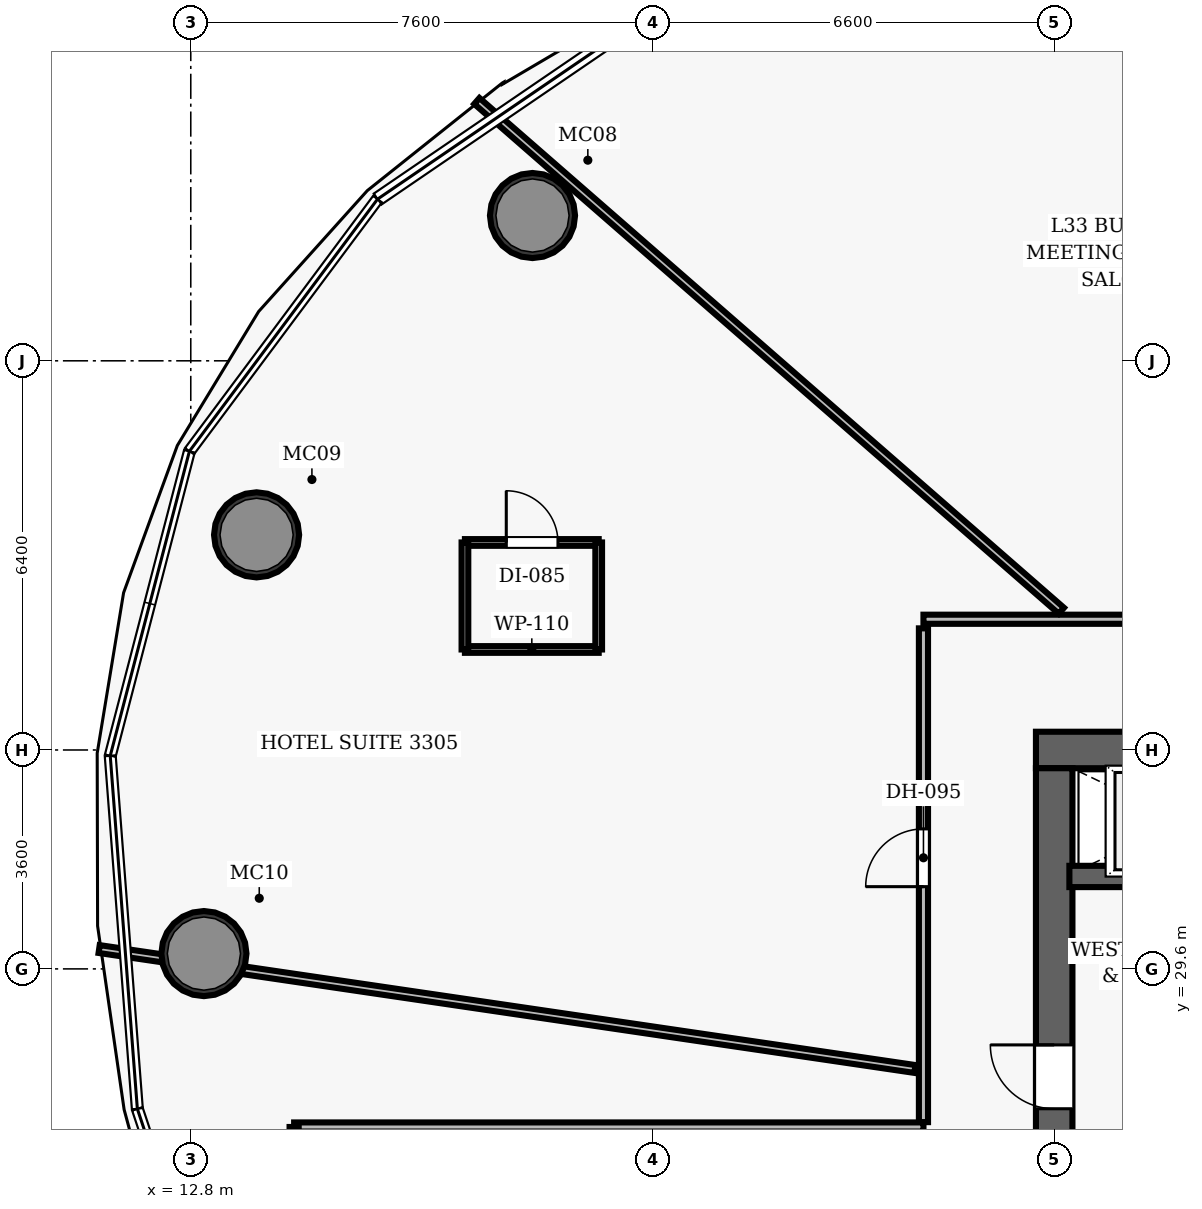
"""IFC4 building model, lengths in metres.
Left out: names, types, materials, properties, quantities, classifications, styles, units other than length and angle.
Written with IfcOpenShell. Run it as: python <this file> out.ifc"""

import sys

from ifc_helpers import new_model, si_unit, direction, frame, frame_2d, origin, origin_2d, place, context, subcontext, project, spatial, rectangle, hollow_circle, extrude, element, fill, save


model = new_model("IFC4")
c1 = context("Model", 3, precision=1e-05, world=origin(), true_north=direction((0.0, 1.0)))
c2 = subcontext(c1, "Body", "Model", "MODEL_VIEW")
j1 = project(units=[si_unit("LENGTHUNIT", "METRE"), si_unit("PLANEANGLEUNIT", "RADIAN")], contexts=[c1])
p1 = place(None, origin())
s1 = spatial("IfcSite", under=j1, at=p1, CompositionType="ELEMENT")
p2 = place(p1, origin())
s2 = spatial("IfcBuilding", under=s1, at=p2, CompositionType="ELEMENT")
p3 = place(p2, frame((0.0, 0.0, 134.3)))
s3 = spatial("IfcBuildingStorey", under=s2, at=p3, CompositionType="ELEMENT", Elevation=134.3)
p4 = place(p3, frame((26.7, 33.2, 0.0), z_axis=(0.0, 0.0, 1.0), x_axis=(1.0, 0.0, 0.0)))
e1 = element("IfcWall", 1, at=p4, inside=s3, PredefinedType="SHEAR", context=c2, shape_type="SweptSolid", body=[
    extrude(rectangle(XDim=22.6, YDim=0.6, at=frame_2d((11.3, 0.0))), origin(), (0.0, 0.0, 1.0), 3.5),
])
p5 = place(p4, frame((4.62, 0.0, 0.0)))
e2 = element("IfcOpeningElement", 2, at=p5, cuts=e1, PredefinedType="OPENING", context=c2, shape_type="SweptSolid", body=[
    extrude(rectangle(XDim=1.05, YDim=2.15, at=frame_2d((0.525, 1.075))), frame((0.0, 0.31, 0.0), z_axis=(0.0, -1.0, 0.0), x_axis=(1.0, 0.0, 0.0)), (0.0, 0.0, 1.0), 0.62),
])
p6 = place(p4, frame((14.52, 0.0, 0.0)))
e3 = element("IfcOpeningElement", 3, at=p6, cuts=e1, PredefinedType="OPENING", context=c2, shape_type="SweptSolid", body=[
    extrude(rectangle(XDim=1.05, YDim=2.15, at=frame_2d((0.525, 1.075))), frame((0.0, 0.31, 0.0), z_axis=(0.0, -1.0, 0.0), x_axis=(1.0, 0.0, 0.0)), (0.0, 0.0, 1.0), 0.62),
])
p7 = place(p3, frame((27.0, 19.1, 0.0), z_axis=(0.0, 0.0, 1.0), x_axis=(0.0, 1.0, 0.0)))
e4 = element("IfcWall", 4, at=p7, inside=s3, PredefinedType="SHEAR", context=c2, shape_type="SweptSolid", body=[
    extrude(rectangle(XDim=13.8, YDim=0.6, at=frame_2d((6.9, 0.0))), origin(), (0.0, 0.0, 1.0), 3.5),
])
p8 = place(p7, frame((8.2, 0.0, 0.0)))
e5 = element("IfcOpeningElement", 5, at=p8, cuts=e4, PredefinedType="OPENING", context=c2, shape_type="SweptSolid", body=[
    extrude(rectangle(XDim=1.05, YDim=2.15, at=frame_2d((0.525, 1.075))), frame((0.0, 0.31, 0.0), z_axis=(0.0, -1.0, 0.0), x_axis=(1.0, 0.0, 0.0)), (0.0, 0.0, 1.0), 0.62),
])
for number, where, z_axis, x_axis in (
    (6, (18.42, 41.989, 0.0), (0.0, 0.0, 1.0), (1.0, 0.0, 0.0)),
    (7, (13.882, 36.738, 0.0), (0.0, 0.0, 1.0), (1.0, 0.0, 0.0)),
    (8, (13.016, 29.852, 0.0), (0.0, 0.0, 1.0), (1.0, 0.0, 0.0)),
):
    element("IfcColumn", number, at=place(p3, frame(where, z_axis=z_axis, x_axis=x_axis)), inside=s3, PredefinedType="COLUMN", context=c2, shape_type="SweptSolid", body=[
        extrude(hollow_circle(Radius=0.7, WallThickness=0.055, at=origin_2d()), origin(), (0.0, 0.0, 1.0), 3.5),
    ])
p9 = place(p3, frame((27.25, 31.12, 0.0), z_axis=(0.0, 0.0, 1.0), x_axis=(1.0, 0.0, 0.0)))
e9 = element("IfcWall", 9, at=p9, inside=s3, PredefinedType="SHEAR", context=c2, shape_type="SweptSolid", body=[
    extrude(rectangle(XDim=3.67, YDim=0.35, at=frame_2d((1.835, 0.0))), origin(), (0.0, 0.0, 1.0), 2.675),
])
p10 = place(p9, frame((1.25, 0.0, 0.0)))
e10 = element("IfcOpeningElement", 10, at=p10, cuts=e9, PredefinedType="OPENING", context=c2, shape_type="SweptSolid", body=[
    extrude(rectangle(XDim=1.1, YDim=2.15, at=frame_2d((0.55, 1.075))), frame((0.0, 0.185, 0.0), z_axis=(0.0, -1.0, 0.0), x_axis=(1.0, 0.0, 0.0)), (0.0, 0.0, 1.0), 0.37),
])
p11 = place(p3, frame((24.85, 35.35, 0.0), z_axis=(0.0, 0.0, 1.0), x_axis=(1.0, 0.0, 0.0)))
e11 = element("IfcWall", 11, at=p11, inside=s3, PredefinedType="PARTITIONING", context=c2, shape_type="SweptSolid", body=[
    extrude(rectangle(XDim=26.0, YDim=0.15, at=frame_2d((13.0, 0.0))), origin(), (0.0, 0.0, 1.0), 2.675),
])
p12 = place(p11, frame((17.4, 0.0, 0.0)))
e12 = element("IfcOpeningElement", 12, at=p12, cuts=e11, PredefinedType="OPENING", context=c2, shape_type="SweptSolid", body=[
    extrude(rectangle(XDim=0.95, YDim=2.15, at=frame_2d((0.475, 1.075))), frame((0.0, 0.085, 0.0), z_axis=(0.0, -1.0, 0.0), x_axis=(1.0, 0.0, 0.0)), (0.0, 0.0, 1.0), 0.17),
])
p13 = place(p11, frame((12.708, 0.0, 0.0)))
e13 = element("IfcOpeningElement", 13, at=p13, cuts=e11, PredefinedType="OPENING", context=c2, shape_type="SweptSolid", body=[
    extrude(rectangle(XDim=0.95, YDim=2.15, at=frame_2d((0.475, 1.075))), frame((0.0, 0.085, 0.0), z_axis=(0.0, -1.0, 0.0), x_axis=(1.0, 0.0, 0.0)), (0.0, 0.0, 1.0), 0.17),
])
p14 = place(p11, frame((7.158, 0.0, 0.0)))
e14 = element("IfcOpeningElement", 14, at=p14, cuts=e11, PredefinedType="OPENING", context=c2, shape_type="SweptSolid", body=[
    extrude(rectangle(XDim=0.95, YDim=2.15, at=frame_2d((0.475, 1.075))), frame((0.0, 0.085, 0.0), z_axis=(0.0, -1.0, 0.0), x_axis=(1.0, 0.0, 0.0)), (0.0, 0.0, 1.0), 0.17),
])
p15 = place(p3, frame((24.85, 27.08, 0.0), z_axis=(0.0, 0.0, 1.0), x_axis=(0.0, 1.0, 0.0)))
e15 = element("IfcWall", 15, at=p15, inside=s3, PredefinedType="PARTITIONING", context=c2, shape_type="SweptSolid", body=[
    extrude(rectangle(XDim=8.12, YDim=0.15, at=frame_2d((4.06, 0.0))), origin(), (0.0, 0.0, 1.0), 2.675),
])
p16 = place(p15, frame((3.872, 0.0, 0.0)))
e16 = element("IfcOpeningElement", 16, at=p16, cuts=e15, PredefinedType="OPENING", context=c2, shape_type="SweptSolid", body=[
    extrude(rectangle(XDim=0.95, YDim=2.15, at=frame_2d((0.475, 1.075))), frame((0.0, 0.085, 0.0), z_axis=(0.0, -1.0, 0.0), x_axis=(1.0, 0.0, 0.0)), (0.0, 0.0, 1.0), 0.17),
])
p17 = place(p3, frame((14.5, 27.0, 0.0), z_axis=(0.0, 0.0, 1.0), x_axis=(1.0, 0.0, 0.0)))
e17 = element("IfcWall", 17, at=p17, inside=s3, PredefinedType="PARTITIONING", context=c2, shape_type="SweptSolid", body=[
    extrude(rectangle(XDim=10.35, YDim=0.15, at=frame_2d((5.175, 0.0))), origin(), (0.0, 0.0, 1.0), 2.675),
])
p18 = place(p3, frame((14.5, 25.0, 0.0), z_axis=(0.0, 0.0, 1.0), x_axis=(0.0, 1.0, 0.0)))
e18 = element("IfcWall", 18, at=p18, inside=s3, PredefinedType="PARTITIONING", context=c2, shape_type="SweptSolid", body=[
    extrude(rectangle(XDim=2.0, YDim=0.15, at=frame_2d((1.0, 0.0))), origin(), (0.0, 0.0, 1.0), 2.675),
])
p19 = place(p3, frame((27.118, 35.49, 0.0), z_axis=(0.0, 0.0, 1.0), x_axis=(-0.753667699891, 0.657255656606, 0.0)))
e19 = element("IfcWall", 19, at=p19, inside=s3, PredefinedType="PARTITIONING", context=c2, shape_type="SweptSolid", body=[
    extrude(rectangle(XDim=12.755, YDim=0.13, at=frame_2d((6.377, 0.0))), origin(), (0.0, 0.0, 1.0), 2.675),
])
p20 = place(p3, frame((24.71, 27.954, 0.0), z_axis=(0.0, 0.0, 1.0), x_axis=(-0.989363707992, 0.145462893234, 0.0)))
e20 = element("IfcWall", 20, at=p20, inside=s3, PredefinedType="PARTITIONING", context=c2, shape_type="SweptSolid", body=[
    extrude(rectangle(XDim=13.561, YDim=0.13, at=frame_2d((6.781, 0.0))), origin(), (0.0, 0.0, 1.0), 2.675),
])
p21 = place(p3, frame((17.309, 34.853, 0.0), z_axis=(0.0, 0.0, 1.0), x_axis=(1.0, 0.0, 0.0)))
e21 = element("IfcWall", 21, at=p21, inside=s3, PredefinedType="PARTITIONING", context=c2, shape_type="SweptSolid", body=[
    extrude(rectangle(XDim=2.2, YDim=0.11, at=frame_2d((1.1, 0.0))), origin(), (0.0, 0.0, 1.0), 2.675),
])
p22 = place(p3, frame((17.309, 36.613, 0.0), z_axis=(0.0, 0.0, 1.0), x_axis=(1.0, 0.0, 0.0)))
e22 = element("IfcWall", 22, at=p22, inside=s3, PredefinedType="PARTITIONING", context=c2, shape_type="SweptSolid", body=[
    extrude(rectangle(XDim=2.2, YDim=0.11, at=frame_2d((1.1, 0.0))), origin(), (0.0, 0.0, 1.0), 2.675),
])
p23 = place(p22, frame((0.68, 0.0, 0.0)))
e23 = element("IfcOpeningElement", 23, at=p23, cuts=e22, PredefinedType="OPENING", context=c2, shape_type="SweptSolid", body=[
    extrude(rectangle(XDim=0.85, YDim=2.1, at=frame_2d((0.425, 1.05))), frame((0.0, 0.065, 0.0), z_axis=(0.0, -1.0, 0.0), x_axis=(1.0, 0.0, 0.0)), (0.0, 0.0, 1.0), 0.13),
])
for number, where, z_axis, x_axis in (
    (24, (17.309, 34.853, 0.0), (0.0, 0.0, 1.0), (0.0, 1.0, 0.0)),
    (25, (19.509, 34.853, 0.0), (0.0, 0.0, 1.0), (0.0, 1.0, 0.0)),
):
    element("IfcWall", number, at=place(p3, frame(where, z_axis=z_axis, x_axis=x_axis)), inside=s3, PredefinedType="PARTITIONING", context=c2, shape_type="SweptSolid", body=[
        extrude(rectangle(XDim=1.76, YDim=0.11, at=frame_2d((0.88, 0.0))), origin(), (0.0, 0.0, 1.0), 2.675),
    ])
p24 = place(p8, origin())
e26 = element("IfcDoor", 26, at=p24, inside=s3, OperationType="SINGLE_SWING_RIGHT", PredefinedType="DOOR", context=c2, shape_type="SweptSolid", body=[
    extrude(rectangle(XDim=1.05, YDim=2.15, at=frame_2d((0.525, 1.075))), frame((0.0, 0.025, 0.0), z_axis=(0.0, -1.0, 0.0), x_axis=(1.0, 0.0, 0.0)), (0.0, 0.0, 1.0), 0.05),
])
fill(e5, e26)
p25 = place(p16, origin())
e27 = element("IfcDoor", 27, at=p25, inside=s3, OperationType="SINGLE_SWING_LEFT", PredefinedType="DOOR", context=c2, shape_type="SweptSolid", body=[
    extrude(rectangle(XDim=0.95, YDim=2.15, at=frame_2d((0.475, 1.075))), frame((0.0, 0.025, 0.0), z_axis=(0.0, -1.0, 0.0), x_axis=(1.0, 0.0, 0.0)), (0.0, 0.0, 1.0), 0.05),
])
fill(e16, e27)
p26 = place(p23, origin())
e28 = element("IfcDoor", 28, at=p26, inside=s3, OperationType="SINGLE_SWING_LEFT", PredefinedType="DOOR", context=c2, shape_type="SweptSolid", body=[
    extrude(rectangle(XDim=0.85, YDim=2.1, at=frame_2d((0.425, 1.05))), frame((0.0, 0.025, 0.0), z_axis=(0.0, -1.0, 0.0), x_axis=(1.0, 0.0, 0.0)), (0.0, 0.0, 1.0), 0.05),
])
fill(e23, e28)
save(model, sys.argv[1])
